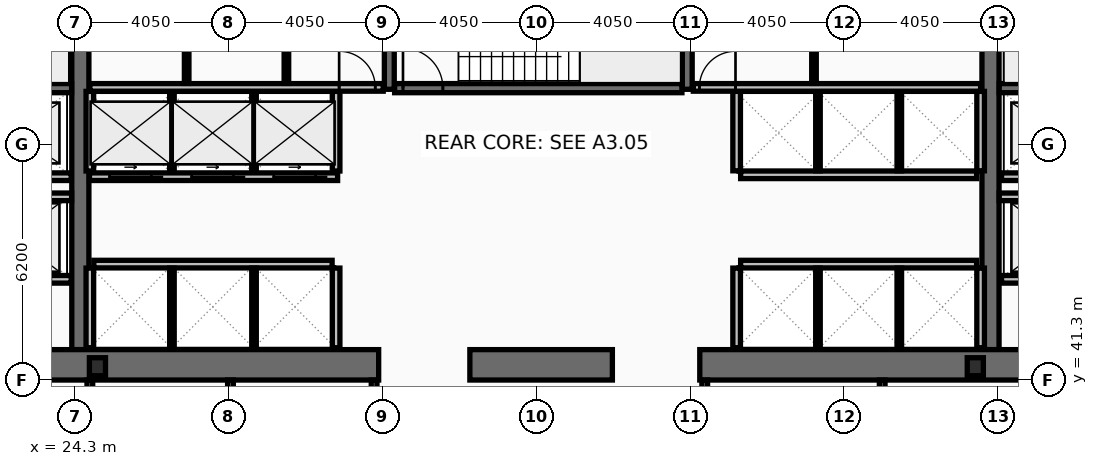
"""IFC4 building model, lengths in metres.
Left out: names, types, materials, properties, quantities, classifications, styles, units other than length and angle.
Written with IfcOpenShell. Run it as: python <this file> out.ifc"""

import sys

from ifc_helpers import new_model, si_unit, direction, frame, frame_2d, origin, origin_2d, place, context, subcontext, project, spatial, rectangle, i_section, extrude, element, fill, save


model = new_model("IFC4")
c1 = context("Model", 3, precision=1e-05, world=origin(), true_north=direction((0.0, 1.0)))
c2 = subcontext(c1, "Body", "Model", "MODEL_VIEW")
j1 = project(units=[si_unit("LENGTHUNIT", "METRE"), si_unit("PLANEANGLEUNIT", "RADIAN")], contexts=[c1])
p1 = place(None, origin())
s1 = spatial("IfcSite", under=j1, at=p1, CompositionType="ELEMENT")
p2 = place(p1, origin())
s2 = spatial("IfcBuilding", under=s1, at=p2, CompositionType="ELEMENT")
p3 = place(p2, frame((0.0, 0.0, 41.8)))
s3 = spatial("IfcBuildingStorey", under=s2, at=p3, CompositionType="ELEMENT", Elevation=41.8)
for number, where, z_axis, x_axis in (
    (1, (24.45, 42.1, 0.0), (0.0, 0.0, 1.0), (0.0, 1.0, 0.0)),
    (2, (48.4, 42.1, 0.0), (0.0, 0.0, 1.0), (0.0, 1.0, 0.0)),
):
    element("IfcWall", number, at=place(p3, frame(where, z_axis=z_axis, x_axis=x_axis)), inside=s3, PredefinedType="SHEAR", context=c2, shape_type="SweptSolid", body=[
        extrude(rectangle(XDim=10.8, YDim=0.45, at=frame_2d((5.4, 0.0))), origin(), (0.0, 0.0, 1.0), 3.82),
    ])
p4 = place(p3, frame((32.3, 41.7, 0.0), z_axis=(0.0, 0.0, 1.0), x_axis=(-1.0, 0.0, 0.0)))
e3 = element("IfcWall", 3, at=p4, inside=s3, PredefinedType="SHEAR", context=c2, shape_type="SweptSolid", body=[
    extrude(rectangle(XDim=11.45, YDim=0.8, at=frame_2d((5.725, 0.0))), origin(), (0.0, 0.0, 1.0), 3.82),
])
p5 = place(p3, frame((38.45, 41.7, 0.0), z_axis=(0.0, 0.0, 1.0), x_axis=(-1.0, 0.0, 0.0)))
e4 = element("IfcWall", 4, at=p5, inside=s3, PredefinedType="SHEAR", context=c2, shape_type="SweptSolid", body=[
    extrude(rectangle(XDim=3.75, YDim=0.8, at=frame_2d((1.875, 0.0))), origin(), (0.0, 0.0, 1.0), 3.82),
])
p6 = place(p3, frame((52.05, 41.7, 0.0), z_axis=(0.0, 0.0, 1.0), x_axis=(-1.0, 0.0, 0.0)))
e5 = element("IfcWall", 5, at=p6, inside=s3, PredefinedType="SHEAR", context=c2, shape_type="SweptSolid", body=[
    extrude(rectangle(XDim=11.3, YDim=0.8, at=frame_2d((5.65, 0.0))), origin(), (0.0, 0.0, 1.0), 3.82),
])
for number, where, z_axis, x_axis in (
    (6, (32.58, 48.95, 0.0), (0.0, 0.0, 1.0), (0.0, 1.0, 0.0)),
    (7, (40.42, 48.95, 0.0), (0.0, 0.0, 1.0), (0.0, 1.0, 0.0)),
):
    element("IfcWall", number, at=place(p3, frame(where, z_axis=z_axis, x_axis=x_axis)), inside=s3, PredefinedType="SHEAR", context=c2, shape_type="SweptSolid", body=[
        extrude(rectangle(XDim=3.95, YDim=0.26, at=frame_2d((1.975, 0.0))), origin(), (0.0, 0.0, 1.0), 3.82),
    ])
p7 = place(p3, frame((17.0, 48.98, 0.0), z_axis=(0.0, 0.0, 1.0), x_axis=(1.0, 0.0, 0.0)))
e8 = element("IfcWall", 8, at=p7, inside=s3, PredefinedType="SHEAR", context=c2, shape_type="SweptSolid", body=[
    extrude(rectangle(XDim=7.22, YDim=0.24, at=frame_2d((3.61, 0.0))), origin(), (0.0, 0.0, 1.0), 3.82),
])
p8 = place(p7, frame((0.22, 0.0, 0.0)))
e9 = element("IfcOpeningElement", 9, at=p8, cuts=e8, PredefinedType="OPENING", context=c2, shape_type="SweptSolid", body=[
    extrude(rectangle(XDim=1.05, YDim=2.15, at=frame_2d((0.525, 1.075))), frame((0.0, 0.13, 0.0), z_axis=(0.0, -1.0, 0.0), x_axis=(1.0, 0.0, 0.0)), (0.0, 0.0, 1.0), 0.26),
])
p9 = place(p3, frame((48.63, 48.98, 0.0), z_axis=(0.0, 0.0, 1.0), x_axis=(1.0, 0.0, 0.0)))
e10 = element("IfcWall", 10, at=p9, inside=s3, PredefinedType="SHEAR", context=c2, shape_type="SweptSolid", body=[
    extrude(rectangle(XDim=7.27, YDim=0.24, at=frame_2d((3.635, 0.0))), origin(), (0.0, 0.0, 1.0), 3.82),
])
p10 = place(p9, frame((6.0, 0.0, 0.0)))
e11 = element("IfcOpeningElement", 11, at=p10, cuts=e10, PredefinedType="OPENING", context=c2, shape_type="SweptSolid", body=[
    extrude(rectangle(XDim=1.05, YDim=2.15, at=frame_2d((0.525, 1.075))), frame((0.0, 0.13, 0.0), z_axis=(0.0, -1.0, 0.0), x_axis=(1.0, 0.0, 0.0)), (0.0, 0.0, 1.0), 0.26),
])
p11 = place(p3, frame((32.72, 48.98, 0.0), z_axis=(0.0, 0.0, 1.0), x_axis=(1.0, 0.0, 0.0)))
e12 = element("IfcWall", 12, at=p11, inside=s3, PredefinedType="SHEAR", context=c2, shape_type="SweptSolid", body=[
    extrude(rectangle(XDim=7.56, YDim=0.24, at=frame_2d((3.78, 0.0))), origin(), (0.0, 0.0, 1.0), 3.82),
])
p12 = place(p11, frame((0.22, 0.0, 0.0)))
e13 = element("IfcOpeningElement", 13, at=p12, cuts=e12, PredefinedType="OPENING", context=c2, shape_type="SweptSolid", body=[
    extrude(rectangle(XDim=1.05, YDim=2.15, at=frame_2d((0.525, 1.075))), frame((0.0, 0.13, 0.0), z_axis=(0.0, -1.0, 0.0), x_axis=(1.0, 0.0, 0.0)), (0.0, 0.0, 1.0), 0.26),
])
for number, where, z_axis, x_axis in (
    (14, (24.9, 41.65, 0.0), (0.0, 0.0, 1.0), (1.0, 0.0, 0.0)),
    (15, (48.0, 41.65, 0.0), (0.0, 0.0, 1.0), (1.0, 0.0, 0.0)),
):
    element("IfcColumn", number, at=place(p3, frame(where, z_axis=z_axis, x_axis=x_axis)), inside=s3, PredefinedType="COLUMN", context=c2, shape_type="SweptSolid", body=[
        extrude(i_section(OverallWidth=0.424, OverallDepth=0.474, WebThickness=0.048, FlangeThickness=0.077, at=origin_2d()), origin(), (0.0, 0.0, 1.0), 4.0),
    ])
p13 = place(p3, frame((51.61, 43.95, 0.0), z_axis=(0.0, 0.0, 1.0), x_axis=(-1.0, 0.0, 0.0)))
e16 = element("IfcWall", 16, at=p13, inside=s3, PredefinedType="PARTITIONING", context=c2, shape_type="SweptSolid", body=[
    extrude(rectangle(XDim=2.92, YDim=0.2, at=frame_2d((1.46, 0.0))), origin(), (0.0, 0.0, 1.0), 3.82),
])
p14 = place(p13, frame((0.81, 0.0, 0.0)))
e17 = element("IfcOpeningElement", 17, at=p14, cuts=e16, PredefinedType="OPENING", context=c2, shape_type="SweptSolid", body=[
    extrude(rectangle(XDim=1.3, YDim=2.18, at=frame_2d((0.65, 1.09))), frame((0.0, 0.11, 0.0), z_axis=(0.0, -1.0, 0.0), x_axis=(1.0, 0.0, 0.0)), (0.0, 0.0, 1.0), 0.22),
])
p15 = place(p3, frame((24.21, 43.95, 0.0), z_axis=(0.0, 0.0, 1.0), x_axis=(-1.0, 0.0, 0.0)))
e18 = element("IfcWall", 18, at=p15, inside=s3, PredefinedType="PARTITIONING", context=c2, shape_type="SweptSolid", body=[
    extrude(rectangle(XDim=2.97, YDim=0.2, at=frame_2d((1.485, 0.0))), origin(), (0.0, 0.0, 1.0), 3.82),
])
p16 = place(p15, frame((0.86, 0.0, 0.0)))
e19 = element("IfcOpeningElement", 19, at=p16, cuts=e18, PredefinedType="OPENING", context=c2, shape_type="SweptSolid", body=[
    extrude(rectangle(XDim=1.3, YDim=2.18, at=frame_2d((0.65, 1.09))), frame((0.0, 0.11, 0.0), z_axis=(0.0, -1.0, 0.0), x_axis=(1.0, 0.0, 0.0)), (0.0, 0.0, 1.0), 0.22),
])
p17 = place(p3, frame((51.61, 46.65, 0.0), z_axis=(0.0, 0.0, 1.0), x_axis=(-1.0, 0.0, 0.0)))
e20 = element("IfcWall", 20, at=p17, inside=s3, PredefinedType="PARTITIONING", context=c2, shape_type="SweptSolid", body=[
    extrude(rectangle(XDim=2.92, YDim=0.2, at=frame_2d((1.46, 0.0))), origin(), (0.0, 0.0, 1.0), 3.82),
])
p18 = place(p17, frame((0.86, 0.0, 0.0)))
e21 = element("IfcOpeningElement", 21, at=p18, cuts=e20, PredefinedType="OPENING", context=c2, shape_type="SweptSolid", body=[
    extrude(rectangle(XDim=1.2, YDim=2.18, at=frame_2d((0.6, 1.09))), frame((0.0, 0.11, 0.0), z_axis=(0.0, -1.0, 0.0), x_axis=(1.0, 0.0, 0.0)), (0.0, 0.0, 1.0), 0.22),
])
p19 = place(p3, frame((24.21, 46.65, 0.0), z_axis=(0.0, 0.0, 1.0), x_axis=(-1.0, 0.0, 0.0)))
e22 = element("IfcWall", 22, at=p19, inside=s3, PredefinedType="PARTITIONING", context=c2, shape_type="SweptSolid", body=[
    extrude(rectangle(XDim=2.97, YDim=0.2, at=frame_2d((1.485, 0.0))), origin(), (0.0, 0.0, 1.0), 3.82),
])
p20 = place(p19, frame((0.91, 0.0, 0.0)))
e23 = element("IfcOpeningElement", 23, at=p20, cuts=e22, PredefinedType="OPENING", context=c2, shape_type="SweptSolid", body=[
    extrude(rectangle(XDim=1.2, YDim=2.18, at=frame_2d((0.6, 1.09))), frame((0.0, 0.11, 0.0), z_axis=(0.0, -1.0, 0.0), x_axis=(1.0, 0.0, 0.0)), (0.0, 0.0, 1.0), 0.22),
])
p21 = place(p3, frame((31.22, 46.65, 0.0), z_axis=(0.0, 0.0, 1.0), x_axis=(-1.0, 0.0, 0.0)))
e24 = element("IfcWall", 24, at=p21, inside=s3, PredefinedType="PARTITIONING", context=c2, shape_type="SweptSolid", body=[
    extrude(rectangle(XDim=6.53, YDim=0.2, at=frame_2d((3.265, 0.0))), origin(), (0.0, 0.0, 1.0), 3.82),
])
p22 = place(p21, frame((4.9, 0.0, 0.0)))
e25 = element("IfcOpeningElement", 25, at=p22, cuts=e24, PredefinedType="OPENING", context=c2, shape_type="SweptSolid", body=[
    extrude(rectangle(XDim=1.1, YDim=2.18, at=frame_2d((0.55, 1.09))), frame((0.0, 0.11, 0.0), z_axis=(0.0, -1.0, 0.0), x_axis=(1.0, 0.0, 0.0)), (0.0, 0.0, 1.0), 0.22),
])
p23 = place(p21, frame((2.74, 0.0, 0.0)))
e26 = element("IfcOpeningElement", 26, at=p23, cuts=e24, PredefinedType="OPENING", context=c2, shape_type="SweptSolid", body=[
    extrude(rectangle(XDim=1.1, YDim=2.18, at=frame_2d((0.55, 1.09))), frame((0.0, 0.11, 0.0), z_axis=(0.0, -1.0, 0.0), x_axis=(1.0, 0.0, 0.0)), (0.0, 0.0, 1.0), 0.22),
])
p24 = place(p21, frame((0.58, 0.0, 0.0)))
e27 = element("IfcOpeningElement", 27, at=p24, cuts=e24, PredefinedType="OPENING", context=c2, shape_type="SweptSolid", body=[
    extrude(rectangle(XDim=1.1, YDim=2.18, at=frame_2d((0.55, 1.09))), frame((0.0, 0.11, 0.0), z_axis=(0.0, -1.0, 0.0), x_axis=(1.0, 0.0, 0.0)), (0.0, 0.0, 1.0), 0.22),
])
p25 = place(p3, frame((21.2, 46.12, 0.0), z_axis=(0.0, 0.0, 1.0), x_axis=(1.0, 0.0, 0.0)))
e28 = element("IfcWall", 28, at=p25, inside=s3, PredefinedType="PARTITIONING", context=c2, shape_type="SweptSolid", body=[
    extrude(rectangle(XDim=3.02, YDim=0.2, at=frame_2d((1.51, 0.0))), origin(), (0.0, 0.0, 1.0), 3.82),
])
p26 = place(p3, frame((48.63, 46.12, 0.0), z_axis=(0.0, 0.0, 1.0), x_axis=(1.0, 0.0, 0.0)))
e29 = element("IfcWall", 29, at=p26, inside=s3, PredefinedType="PARTITIONING", context=c2, shape_type="SweptSolid", body=[
    extrude(rectangle(XDim=3.07, YDim=0.2, at=frame_2d((1.535, 0.0))), origin(), (0.0, 0.0, 1.0), 3.82),
])
for number, where, z_axis, x_axis in (
    (30, (24.7, 46.8, 0.0), (0.0, 0.0, 1.0), (0.0, 1.0, 0.0)),
    (31, (31.18, 46.8, 0.0), (0.0, 0.0, 1.0), (0.0, 1.0, 0.0)),
):
    element("IfcWall", number, at=place(p3, frame(where, z_axis=z_axis, x_axis=x_axis)), inside=s3, PredefinedType="PARTITIONING", context=c2, shape_type="SweptSolid", body=[
        extrude(rectangle(XDim=2.095, YDim=0.2, at=frame_2d((1.047, 0.0))), origin(), (0.0, 0.0, 1.0), 3.82),
    ])
for number, where, z_axis, x_axis in (
    (32, (26.86, 46.8, 0.0), (0.0, 0.0, 1.0), (0.0, 1.0, 0.0)),
    (33, (29.02, 46.8, 0.0), (0.0, 0.0, 1.0), (0.0, 1.0, 0.0)),
):
    element("IfcWall", number, at=place(p3, frame(where, z_axis=z_axis, x_axis=x_axis)), inside=s3, PredefinedType="PARTITIONING", context=c2, shape_type="SweptSolid", body=[
        extrude(rectangle(XDim=2.095, YDim=0.12, at=frame_2d((1.047, 0.0))), origin(), (0.0, 0.0, 1.0), 3.82),
    ])
p27 = place(p3, frame((24.805, 44.35, 0.0), z_axis=(0.0, 0.0, 1.0), x_axis=(1.0, 0.0, 0.0)))
e34 = element("IfcWall", 34, at=p27, inside=s3, PredefinedType="PARTITIONING", context=c2, shape_type="SweptSolid", body=[
    extrude(rectangle(XDim=6.27, YDim=0.2, at=frame_2d((3.135, 0.0))), origin(), (0.0, 0.0, 1.0), 3.82),
])
for number, where, z_axis, x_axis in (
    (35, (24.7, 42.15, 0.0), (0.0, 0.0, 1.0), (0.0, 1.0, 0.0)),
    (36, (31.18, 42.15, 0.0), (0.0, 0.0, 1.0), (0.0, 1.0, 0.0)),
):
    element("IfcWall", number, at=place(p3, frame(where, z_axis=z_axis, x_axis=x_axis)), inside=s3, PredefinedType="PARTITIONING", context=c2, shape_type="SweptSolid", body=[
        extrude(rectangle(XDim=2.095, YDim=0.2, at=frame_2d((1.048, 0.0))), origin(), (0.0, 0.0, 1.0), 3.82),
    ])
for number, where, z_axis, x_axis in (
    (37, (26.86, 42.15, 0.0), (0.0, 0.0, 1.0), (0.0, 1.0, 0.0)),
    (38, (29.02, 42.15, 0.0), (0.0, 0.0, 1.0), (0.0, 1.0, 0.0)),
):
    element("IfcWall", number, at=place(p3, frame(where, z_axis=z_axis, x_axis=x_axis)), inside=s3, PredefinedType="PARTITIONING", context=c2, shape_type="SweptSolid", body=[
        extrude(rectangle(XDim=2.095, YDim=0.12, at=frame_2d((1.048, 0.0))), origin(), (0.0, 0.0, 1.0), 3.82),
    ])
p28 = place(p3, frame((41.825, 46.7, 0.0), z_axis=(0.0, 0.0, 1.0), x_axis=(1.0, 0.0, 0.0)))
e39 = element("IfcWall", 39, at=p28, inside=s3, PredefinedType="PARTITIONING", context=c2, shape_type="SweptSolid", body=[
    extrude(rectangle(XDim=6.21, YDim=0.2, at=frame_2d((3.105, 0.0))), origin(), (0.0, 0.0, 1.0), 3.82),
])
for number, where, z_axis, x_axis in (
    (40, (41.72, 46.805, 0.0), (0.0, 0.0, 1.0), (0.0, 1.0, 0.0)),
    (41, (48.14, 46.805, 0.0), (0.0, 0.0, 1.0), (0.0, 1.0, 0.0)),
):
    element("IfcWall", number, at=place(p3, frame(where, z_axis=z_axis, x_axis=x_axis)), inside=s3, PredefinedType="PARTITIONING", context=c2, shape_type="SweptSolid", body=[
        extrude(rectangle(XDim=2.09, YDim=0.2, at=frame_2d((1.045, 0.0))), origin(), (0.0, 0.0, 1.0), 3.82),
    ])
for number, where, z_axis, x_axis in (
    (42, (43.86, 46.805, 0.0), (0.0, 0.0, 1.0), (0.0, 1.0, 0.0)),
    (43, (46.0, 46.805, 0.0), (0.0, 0.0, 1.0), (0.0, 1.0, 0.0)),
):
    element("IfcWall", number, at=place(p3, frame(where, z_axis=z_axis, x_axis=x_axis)), inside=s3, PredefinedType="PARTITIONING", context=c2, shape_type="SweptSolid", body=[
        extrude(rectangle(XDim=2.09, YDim=0.12, at=frame_2d((1.045, 0.0))), origin(), (0.0, 0.0, 1.0), 3.82),
    ])
p29 = place(p3, frame((41.825, 44.35, 0.0), z_axis=(0.0, 0.0, 1.0), x_axis=(1.0, 0.0, 0.0)))
e44 = element("IfcWall", 44, at=p29, inside=s3, PredefinedType="PARTITIONING", context=c2, shape_type="SweptSolid", body=[
    extrude(rectangle(XDim=6.21, YDim=0.2, at=frame_2d((3.105, 0.0))), origin(), (0.0, 0.0, 1.0), 3.82),
])
for number, where, z_axis, x_axis in (
    (45, (41.72, 42.15, 0.0), (0.0, 0.0, 1.0), (0.0, 1.0, 0.0)),
    (46, (48.14, 42.15, 0.0), (0.0, 0.0, 1.0), (0.0, 1.0, 0.0)),
):
    element("IfcWall", number, at=place(p3, frame(where, z_axis=z_axis, x_axis=x_axis)), inside=s3, PredefinedType="PARTITIONING", context=c2, shape_type="SweptSolid", body=[
        extrude(rectangle(XDim=2.095, YDim=0.2, at=frame_2d((1.048, 0.0))), origin(), (0.0, 0.0, 1.0), 3.82),
    ])
for number, where, z_axis, x_axis in (
    (47, (43.86, 42.15, 0.0), (0.0, 0.0, 1.0), (0.0, 1.0, 0.0)),
    (48, (46.0, 42.15, 0.0), (0.0, 0.0, 1.0), (0.0, 1.0, 0.0)),
):
    element("IfcWall", number, at=place(p3, frame(where, z_axis=z_axis, x_axis=x_axis)), inside=s3, PredefinedType="PARTITIONING", context=c2, shape_type="SweptSolid", body=[
        extrude(rectangle(XDim=2.095, YDim=0.12, at=frame_2d((1.048, 0.0))), origin(), (0.0, 0.0, 1.0), 3.82),
    ])
p30 = place(p3, frame((24.7, 49.0, 0.0), z_axis=(0.0, 0.0, 1.0), x_axis=(1.0, 0.0, 0.0)))
e49 = element("IfcWall", 49, at=p30, inside=s3, PredefinedType="PARTITIONING", context=c2, shape_type="SweptSolid", body=[
    extrude(rectangle(XDim=7.72, YDim=0.2, at=frame_2d((3.86, 0.0))), origin(), (0.0, 0.0, 1.0), 3.82),
])
p31 = place(p30, frame((6.56, 0.0, 0.0)))
e50 = element("IfcOpeningElement", 50, at=p31, cuts=e49, PredefinedType="OPENING", context=c2, shape_type="SweptSolid", body=[
    extrude(rectangle(XDim=0.95, YDim=2.1, at=frame_2d((0.475, 1.05))), frame((0.0, 0.11, 0.0), z_axis=(0.0, -1.0, 0.0), x_axis=(1.0, 0.0, 0.0)), (0.0, 0.0, 1.0), 0.22),
])
p32 = place(p3, frame((27.248, 49.105, 0.0), z_axis=(0.0, 0.0, 1.0), x_axis=(0.0, 1.0, 0.0)))
e51 = element("IfcWall", 51, at=p32, inside=s3, PredefinedType="PARTITIONING", context=c2, shape_type="SweptSolid", body=[
    extrude(rectangle(XDim=3.69, YDim=0.12, at=frame_2d((1.845, 0.0))), origin(), (0.0, 0.0, 1.0), 3.82),
])
p33 = place(p32, frame((1.05, 0.0, 0.0)))
e52 = element("IfcOpeningElement", 52, at=p33, cuts=e51, PredefinedType="OPENING", context=c2, shape_type="SweptSolid", body=[
    extrude(rectangle(XDim=0.9, YDim=2.05, at=frame_2d((0.45, 1.025))), frame((0.0, 0.07, 0.0), z_axis=(0.0, -1.0, 0.0), x_axis=(1.0, 0.0, 0.0)), (0.0, 0.0, 1.0), 0.14),
])
p34 = place(p3, frame((29.872, 49.105, 0.0), z_axis=(0.0, 0.0, 1.0), x_axis=(0.0, 1.0, 0.0)))
e53 = element("IfcWall", 53, at=p34, inside=s3, PredefinedType="PARTITIONING", context=c2, shape_type="SweptSolid", body=[
    extrude(rectangle(XDim=3.69, YDim=0.12, at=frame_2d((1.845, 0.0))), origin(), (0.0, 0.0, 1.0), 3.82),
])
p35 = place(p34, frame((1.05, 0.0, 0.0)))
e54 = element("IfcOpeningElement", 54, at=p35, cuts=e53, PredefinedType="OPENING", context=c2, shape_type="SweptSolid", body=[
    extrude(rectangle(XDim=0.9, YDim=2.05, at=frame_2d((0.45, 1.025))), frame((0.0, 0.07, 0.0), z_axis=(0.0, -1.0, 0.0), x_axis=(1.0, 0.0, 0.0)), (0.0, 0.0, 1.0), 0.14),
])
p36 = place(p3, frame((40.58, 49.0, 0.0), z_axis=(0.0, 0.0, 1.0), x_axis=(1.0, 0.0, 0.0)))
e55 = element("IfcWall", 55, at=p36, inside=s3, PredefinedType="PARTITIONING", context=c2, shape_type="SweptSolid", body=[
    extrude(rectangle(XDim=7.56, YDim=0.2, at=frame_2d((3.78, 0.0))), origin(), (0.0, 0.0, 1.0), 3.82),
])
p37 = place(p36, frame((0.16, 0.0, 0.0)))
e56 = element("IfcOpeningElement", 56, at=p37, cuts=e55, PredefinedType="OPENING", context=c2, shape_type="SweptSolid", body=[
    extrude(rectangle(XDim=0.95, YDim=2.1, at=frame_2d((0.475, 1.05))), frame((0.0, 0.11, 0.0), z_axis=(0.0, -1.0, 0.0), x_axis=(1.0, 0.0, 0.0)), (0.0, 0.0, 1.0), 0.22),
])
p38 = place(p3, frame((43.755, 49.105, 0.0), z_axis=(0.0, 0.0, 1.0), x_axis=(0.0, 1.0, 0.0)))
e57 = element("IfcWall", 57, at=p38, inside=s3, PredefinedType="PARTITIONING", context=c2, shape_type="SweptSolid", body=[
    extrude(rectangle(XDim=3.69, YDim=0.12, at=frame_2d((1.845, 0.0))), origin(), (0.0, 0.0, 1.0), 3.82),
])
p39 = place(p38, frame((1.05, 0.0, 0.0)))
e58 = element("IfcOpeningElement", 58, at=p39, cuts=e57, PredefinedType="OPENING", context=c2, shape_type="SweptSolid", body=[
    extrude(rectangle(XDim=0.9, YDim=2.05, at=frame_2d((0.45, 1.025))), frame((0.0, 0.07, 0.0), z_axis=(0.0, -1.0, 0.0), x_axis=(1.0, 0.0, 0.0)), (0.0, 0.0, 1.0), 0.14),
])
p40 = place(p3, frame((24.7, 38.28, 0.0), z_axis=(0.0, 0.0, 1.0), x_axis=(0.0, 1.0, 0.0)))
e59 = element("IfcWall", 59, at=p40, inside=s3, PredefinedType="PARTITIONING", context=c2, shape_type="SweptSolid", body=[
    extrude(rectangle(XDim=3.02, YDim=0.15, at=frame_2d((1.51, 0.0))), origin(), (0.0, 0.0, 1.0), 3.01),
])
for number, where, z_axis, x_axis in (
    (60, (28.4, 38.28, 0.0), (0.0, 0.0, 1.0), (0.0, 1.0, 0.0)),
    (61, (32.18, 38.28, 0.0), (0.0, 0.0, 1.0), (0.0, 1.0, 0.0)),
    (62, (40.88, 38.28, 0.0), (0.0, 0.0, 1.0), (0.0, 1.0, 0.0)),
    (63, (45.55, 38.28, 0.0), (0.0, 0.0, 1.0), (0.0, 1.0, 0.0)),
):
    element("IfcWall", number, at=place(p3, frame(where, z_axis=z_axis, x_axis=x_axis)), inside=s3, PredefinedType="PARTITIONING", context=c2, shape_type="SweptSolid", body=[
        extrude(rectangle(XDim=3.02, YDim=0.15, at=frame_2d((1.51, 0.0))), origin(), (0.0, 0.0, 1.0), 3.82),
    ])
p41 = place(p12, origin())
e64 = element("IfcDoor", 64, at=p41, inside=s3, OperationType="SINGLE_SWING_LEFT", PredefinedType="DOOR", context=c2, shape_type="SweptSolid", body=[
    extrude(rectangle(XDim=1.05, YDim=2.15, at=frame_2d((0.525, 1.075))), frame((0.0, 0.025, 0.0), z_axis=(0.0, -1.0, 0.0), x_axis=(1.0, 0.0, 0.0)), (0.0, 0.0, 1.0), 0.05),
])
fill(e13, e64)
p42 = place(p22, origin())
e65 = element("IfcDoor", 65, at=p42, inside=s3, OperationType="SLIDING_TO_LEFT", PredefinedType="DOOR", context=c2, shape_type="SweptSolid", body=[
    extrude(rectangle(XDim=1.1, YDim=2.18, at=frame_2d((0.55, 1.09))), frame((0.0, 0.025, 0.0), z_axis=(0.0, -1.0, 0.0), x_axis=(1.0, 0.0, 0.0)), (0.0, 0.0, 1.0), 0.05),
])
fill(e25, e65)
p43 = place(p23, origin())
e66 = element("IfcDoor", 66, at=p43, inside=s3, OperationType="SLIDING_TO_LEFT", PredefinedType="DOOR", context=c2, shape_type="SweptSolid", body=[
    extrude(rectangle(XDim=1.1, YDim=2.18, at=frame_2d((0.55, 1.09))), frame((0.0, 0.025, 0.0), z_axis=(0.0, -1.0, 0.0), x_axis=(1.0, 0.0, 0.0)), (0.0, 0.0, 1.0), 0.05),
])
fill(e26, e66)
p44 = place(p24, origin())
e67 = element("IfcDoor", 67, at=p44, inside=s3, OperationType="SLIDING_TO_LEFT", PredefinedType="DOOR", context=c2, shape_type="SweptSolid", body=[
    extrude(rectangle(XDim=1.1, YDim=2.18, at=frame_2d((0.55, 1.09))), frame((0.0, 0.025, 0.0), z_axis=(0.0, -1.0, 0.0), x_axis=(1.0, 0.0, 0.0)), (0.0, 0.0, 1.0), 0.05),
])
fill(e27, e67)
p45 = place(p31, origin())
e68 = element("IfcDoor", 68, at=p45, inside=s3, OperationType="SINGLE_SWING_LEFT", PredefinedType="DOOR", context=c2, shape_type="SweptSolid", body=[
    extrude(rectangle(XDim=0.95, YDim=2.1, at=frame_2d((0.475, 1.05))), frame((0.0, 0.025, 0.0), z_axis=(0.0, -1.0, 0.0), x_axis=(1.0, 0.0, 0.0)), (0.0, 0.0, 1.0), 0.05),
])
fill(e50, e68)
p46 = place(p37, origin())
e69 = element("IfcDoor", 69, at=p46, inside=s3, OperationType="SINGLE_SWING_RIGHT", PredefinedType="DOOR", context=c2, shape_type="SweptSolid", body=[
    extrude(rectangle(XDim=0.95, YDim=2.1, at=frame_2d((0.475, 1.05))), frame((0.0, 0.025, 0.0), z_axis=(0.0, -1.0, 0.0), x_axis=(1.0, 0.0, 0.0)), (0.0, 0.0, 1.0), 0.05),
])
fill(e56, e69)
save(model, sys.argv[1])
